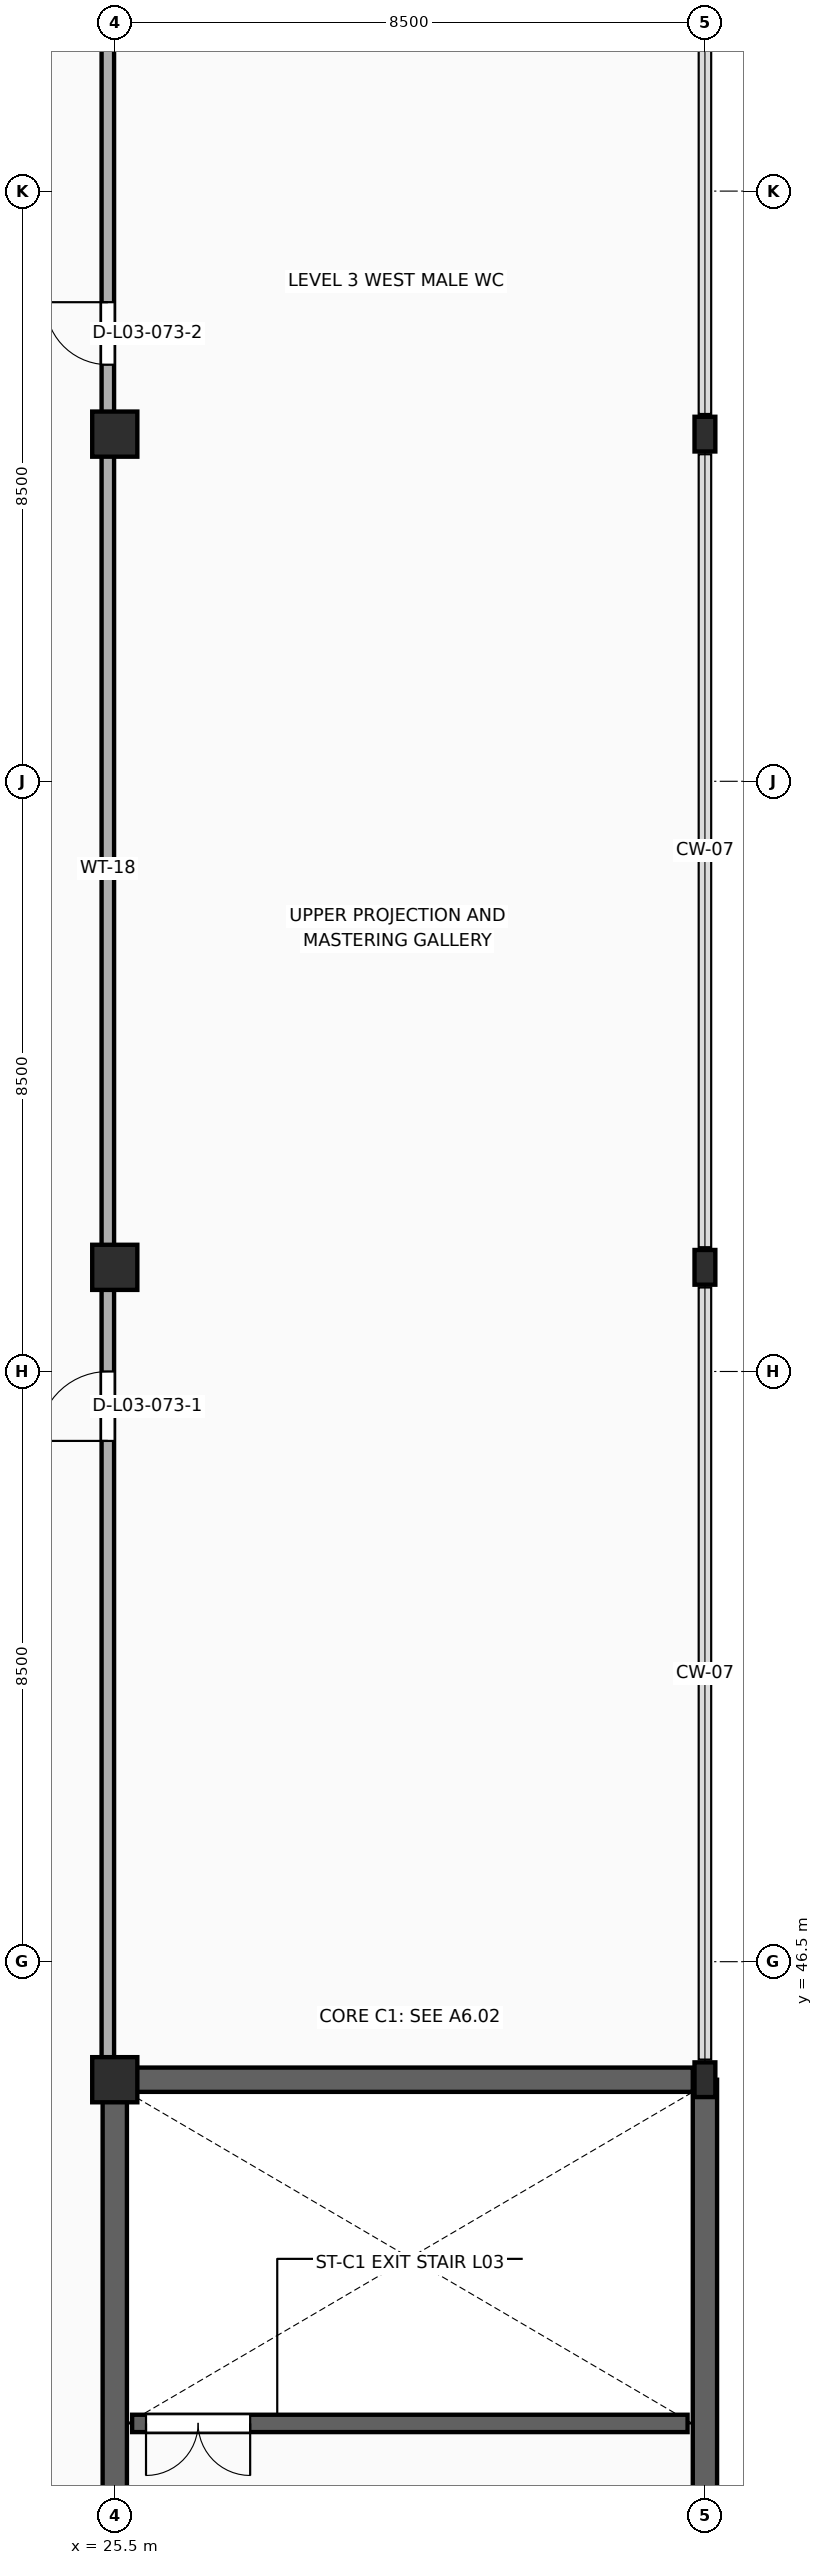
"""IFC4 building model, lengths in metres.
Left out: names, types, materials, properties, quantities, classifications, styles, units other than length and angle.
Written with IfcOpenShell. Run it as: python <this file> out.ifc"""

import sys

from ifc_helpers import new_model, si_unit, direction, frame, frame_2d, origin, origin_2d, place, context, subcontext, project, spatial, rectangle, hollow_rectangle, extrude, element, fill, save


model = new_model("IFC4")
c1 = context("Model", 3, precision=1e-05, world=origin(), true_north=direction((0.0, 1.0)))
c2 = subcontext(c1, "Body", "Model", "MODEL_VIEW")
j1 = project(units=[si_unit("LENGTHUNIT", "METRE"), si_unit("PLANEANGLEUNIT", "RADIAN")], contexts=[c1])
p1 = place(None, origin())
s1 = spatial("IfcSite", under=j1, at=p1, CompositionType="ELEMENT")
p2 = place(p1, origin())
s2 = spatial("IfcBuilding", under=s1, at=p2, CompositionType="ELEMENT")
p3 = place(p2, frame((0.0, 0.0, 15.0)))
s3 = spatial("IfcBuildingStorey", under=s2, at=p3, CompositionType="ELEMENT", Elevation=15.0)
p4 = place(p3, frame((25.5, 32.0, 0.0), z_axis=(0.0, 0.0, 1.0), x_axis=(0.0, 1.0, 0.0)))
e1 = element("IfcWall", 1, at=p4, inside=s3, PredefinedType="SHEAR", context=c2, shape_type="SweptSolid", body=[
    extrude(rectangle(XDim=12.8, YDim=0.35, at=frame_2d((6.4, 0.0))), origin(), (0.0, 0.0, 1.0), 4.49),
])
p5 = place(p4, frame((1.25, 0.0, 0.0)))
e2 = element("IfcOpeningElement", 2, at=p5, cuts=e1, PredefinedType="OPENING", context=c2, shape_type="SweptSolid", body=[
    extrude(rectangle(XDim=1.05, YDim=2.15, at=frame_2d((0.525, 1.075))), frame((0.0, 0.187, 0.0), z_axis=(0.0, -1.0, 0.0), x_axis=(1.0, 0.0, 0.0)), (0.0, 0.0, 1.0), 0.374),
])
p6 = place(p3, frame((34.0, 32.0, 0.0), z_axis=(0.0, 0.0, 1.0), x_axis=(0.0, 1.0, 0.0)))
e3 = element("IfcWall", 3, at=p6, inside=s3, PredefinedType="SHEAR", context=c2, shape_type="SweptSolid", body=[
    extrude(rectangle(XDim=12.8, YDim=0.35, at=frame_2d((6.4, 0.0))), origin(), (0.0, 0.0, 1.0), 4.49),
])
p7 = place(p3, frame((25.675, 44.8, 0.0), z_axis=(0.0, 0.0, 1.0), x_axis=(1.0, 0.0, 0.0)))
e4 = element("IfcWall", 4, at=p7, inside=s3, PredefinedType="SHEAR", context=c2, shape_type="SweptSolid", body=[
    extrude(rectangle(XDim=8.15, YDim=0.35, at=frame_2d((4.075, 0.0))), origin(), (0.0, 0.0, 1.0), 4.49),
])
p8 = place(p3, frame((25.75, 39.85, 0.0), z_axis=(0.0, 0.0, 1.0), x_axis=(1.0, 0.0, 0.0)))
e5 = element("IfcWall", 5, at=p8, inside=s3, PredefinedType="STANDARD", context=c2, shape_type="SweptSolid", body=[
    extrude(rectangle(XDim=8.0, YDim=0.25, at=frame_2d((4.0, 0.0))), origin(), (0.0, 0.0, 1.0), 4.49),
])
p9 = place(p8, frame((0.2, 0.0, 0.0)))
e6 = element("IfcOpeningElement", 6, at=p9, cuts=e5, PredefinedType="OPENING", context=c2, shape_type="SweptSolid", body=[
    extrude(rectangle(XDim=1.5, YDim=2.2, at=frame_2d((0.75, 1.1))), frame((0.0, 0.137, 0.0), z_axis=(0.0, -1.0, 0.0), x_axis=(1.0, 0.0, 0.0)), (0.0, 0.0, 1.0), 0.274),
])
p10 = place(p3, frame((25.5, 44.8, 0.0), z_axis=(0.0, 0.0, 1.0), x_axis=(1.0, 0.0, 0.0)))
e7 = element("IfcColumn", 7, at=p10, inside=s3, PredefinedType="COLUMN", context=c2, shape_type="SweptSolid", body=[
    extrude(rectangle(XDim=0.65, YDim=0.65, at=origin_2d()), origin(), (0.0, 0.0, 1.0), 4.49),
])
for number, where, z_axis, x_axis in (
    (8, (25.5, 56.5, 0.0), (0.0, 0.0, 1.0), (1.0, 0.0, 0.0)),
    (9, (25.5, 68.5, 0.0), (0.0, 0.0, 1.0), (1.0, 0.0, 0.0)),
):
    element("IfcColumn", number, at=place(p3, frame(where, z_axis=z_axis, x_axis=x_axis)), inside=s3, PredefinedType="COLUMN", context=c2, shape_type="SweptSolid", body=[
        extrude(rectangle(XDim=0.65, YDim=0.65, at=origin_2d()), origin(), (0.0, 0.0, 1.0), 4.54),
    ])
p11 = place(p3, frame((34.0, 44.8, 0.0), z_axis=(0.0, 0.0, 1.0), x_axis=(1.0, 0.0, 0.0)))
e10 = element("IfcColumn", 10, at=p11, inside=s3, PredefinedType="COLUMN", context=c2, shape_type="SweptSolid", body=[
    extrude(hollow_rectangle(XDim=0.3, YDim=0.5, WallThickness=0.016, at=origin_2d()), origin(), (0.0, 0.0, 1.0), 4.49),
])
for number, where, z_axis, x_axis in (
    (11, (34.0, 56.5, 0.0), (0.0, 0.0, 1.0), (1.0, 0.0, 0.0)),
    (12, (34.0, 68.5, 0.0), (0.0, 0.0, 1.0), (1.0, 0.0, 0.0)),
):
    element("IfcColumn", number, at=place(p3, frame(where, z_axis=z_axis, x_axis=x_axis)), inside=s3, PredefinedType="COLUMN", context=c2, shape_type="SweptSolid", body=[
        extrude(hollow_rectangle(XDim=0.3, YDim=0.5, WallThickness=0.016, at=origin_2d()), origin(), (0.0, 0.0, 1.0), 4.54),
    ])
p12 = place(p3, frame((25.4, 45.0, 0.0), z_axis=(0.0, 0.0, 1.0), x_axis=(0.0, 1.0, 0.0)))
e13 = element("IfcWall", 13, at=p12, inside=s3, PredefinedType="PARTITIONING", context=c2, shape_type="SweptSolid", body=[
    extrude(rectangle(XDim=35.2, YDim=0.18, at=frame_2d((17.6, 0.0))), origin(), (0.0, 0.0, 1.0), 3.89),
])
p13 = place(p12, frame((9.0, 0.0, 0.0)))
e14 = element("IfcOpeningElement", 14, at=p13, cuts=e13, PredefinedType="OPENING", context=c2, shape_type="SweptSolid", body=[
    extrude(rectangle(XDim=1.0, YDim=2.15, at=frame_2d((0.5, 1.075))), frame((0.0, 0.102, 0.0), z_axis=(0.0, -1.0, 0.0), x_axis=(1.0, 0.0, 0.0)), (0.0, 0.0, 1.0), 0.204),
])
p14 = place(p12, frame((24.5, 0.0, 0.0)))
e15 = element("IfcOpeningElement", 15, at=p14, cuts=e13, PredefinedType="OPENING", context=c2, shape_type="SweptSolid", body=[
    extrude(rectangle(XDim=0.9, YDim=2.15, at=frame_2d((0.45, 1.075))), frame((0.0, 0.102, 0.0), z_axis=(0.0, -1.0, 0.0), x_axis=(1.0, 0.0, 0.0)), (0.0, 0.0, 1.0), 0.204),
])
p15 = place(p12, frame((29.5, 0.0, 0.0)))
e16 = element("IfcOpeningElement", 16, at=p15, cuts=e13, PredefinedType="OPENING", context=c2, shape_type="SweptSolid", body=[
    extrude(rectangle(XDim=0.9, YDim=2.15, at=frame_2d((0.45, 1.075))), frame((0.0, 0.102, 0.0), z_axis=(0.0, -1.0, 0.0), x_axis=(1.0, 0.0, 0.0)), (0.0, 0.0, 1.0), 0.204),
])
p16 = place(p12, frame((33.4, 0.0, 0.0)))
e17 = element("IfcOpeningElement", 17, at=p16, cuts=e13, PredefinedType="OPENING", context=c2, shape_type="SweptSolid", body=[
    extrude(rectangle(XDim=0.95, YDim=2.15, at=frame_2d((0.475, 1.075))), frame((0.0, 0.102, 0.0), z_axis=(0.0, -1.0, 0.0), x_axis=(1.0, 0.0, 0.0)), (0.0, 0.0, 1.0), 0.204),
])
p17 = place(p9, frame((1.5, 0.0, 0.0), z_axis=(0.0, 0.0, 1.0), x_axis=(-1.0, 0.0, 0.0)))
e18 = element("IfcDoor", 18, at=p17, inside=s3, OperationType="DOUBLE_DOOR_SINGLE_SWING", PredefinedType="DOOR", context=c2, shape_type="SweptSolid", body=[
    extrude(rectangle(XDim=1.5, YDim=2.2, at=frame_2d((0.75, 1.1))), frame((0.0, 0.025, 0.0), z_axis=(0.0, -1.0, 0.0), x_axis=(1.0, 0.0, 0.0)), (0.0, 0.0, 1.0), 0.05),
])
fill(e6, e18)
p18 = place(p13, origin())
e19 = element("IfcDoor", 19, at=p18, inside=s3, OperationType="SINGLE_SWING_LEFT", PredefinedType="DOOR", context=c2, shape_type="SweptSolid", body=[
    extrude(rectangle(XDim=1.0, YDim=2.15, at=frame_2d((0.5, 1.075))), frame((0.0, 0.025, 0.0), z_axis=(0.0, -1.0, 0.0), x_axis=(1.0, 0.0, 0.0)), (0.0, 0.0, 1.0), 0.05),
])
fill(e14, e19)
p19 = place(p14, origin())
e20 = element("IfcDoor", 20, at=p19, inside=s3, OperationType="SINGLE_SWING_RIGHT", PredefinedType="DOOR", context=c2, shape_type="SweptSolid", body=[
    extrude(rectangle(XDim=0.9, YDim=2.15, at=frame_2d((0.45, 1.075))), frame((0.0, 0.025, 0.0), z_axis=(0.0, -1.0, 0.0), x_axis=(1.0, 0.0, 0.0)), (0.0, 0.0, 1.0), 0.05),
])
fill(e15, e20)
save(model, sys.argv[1])
